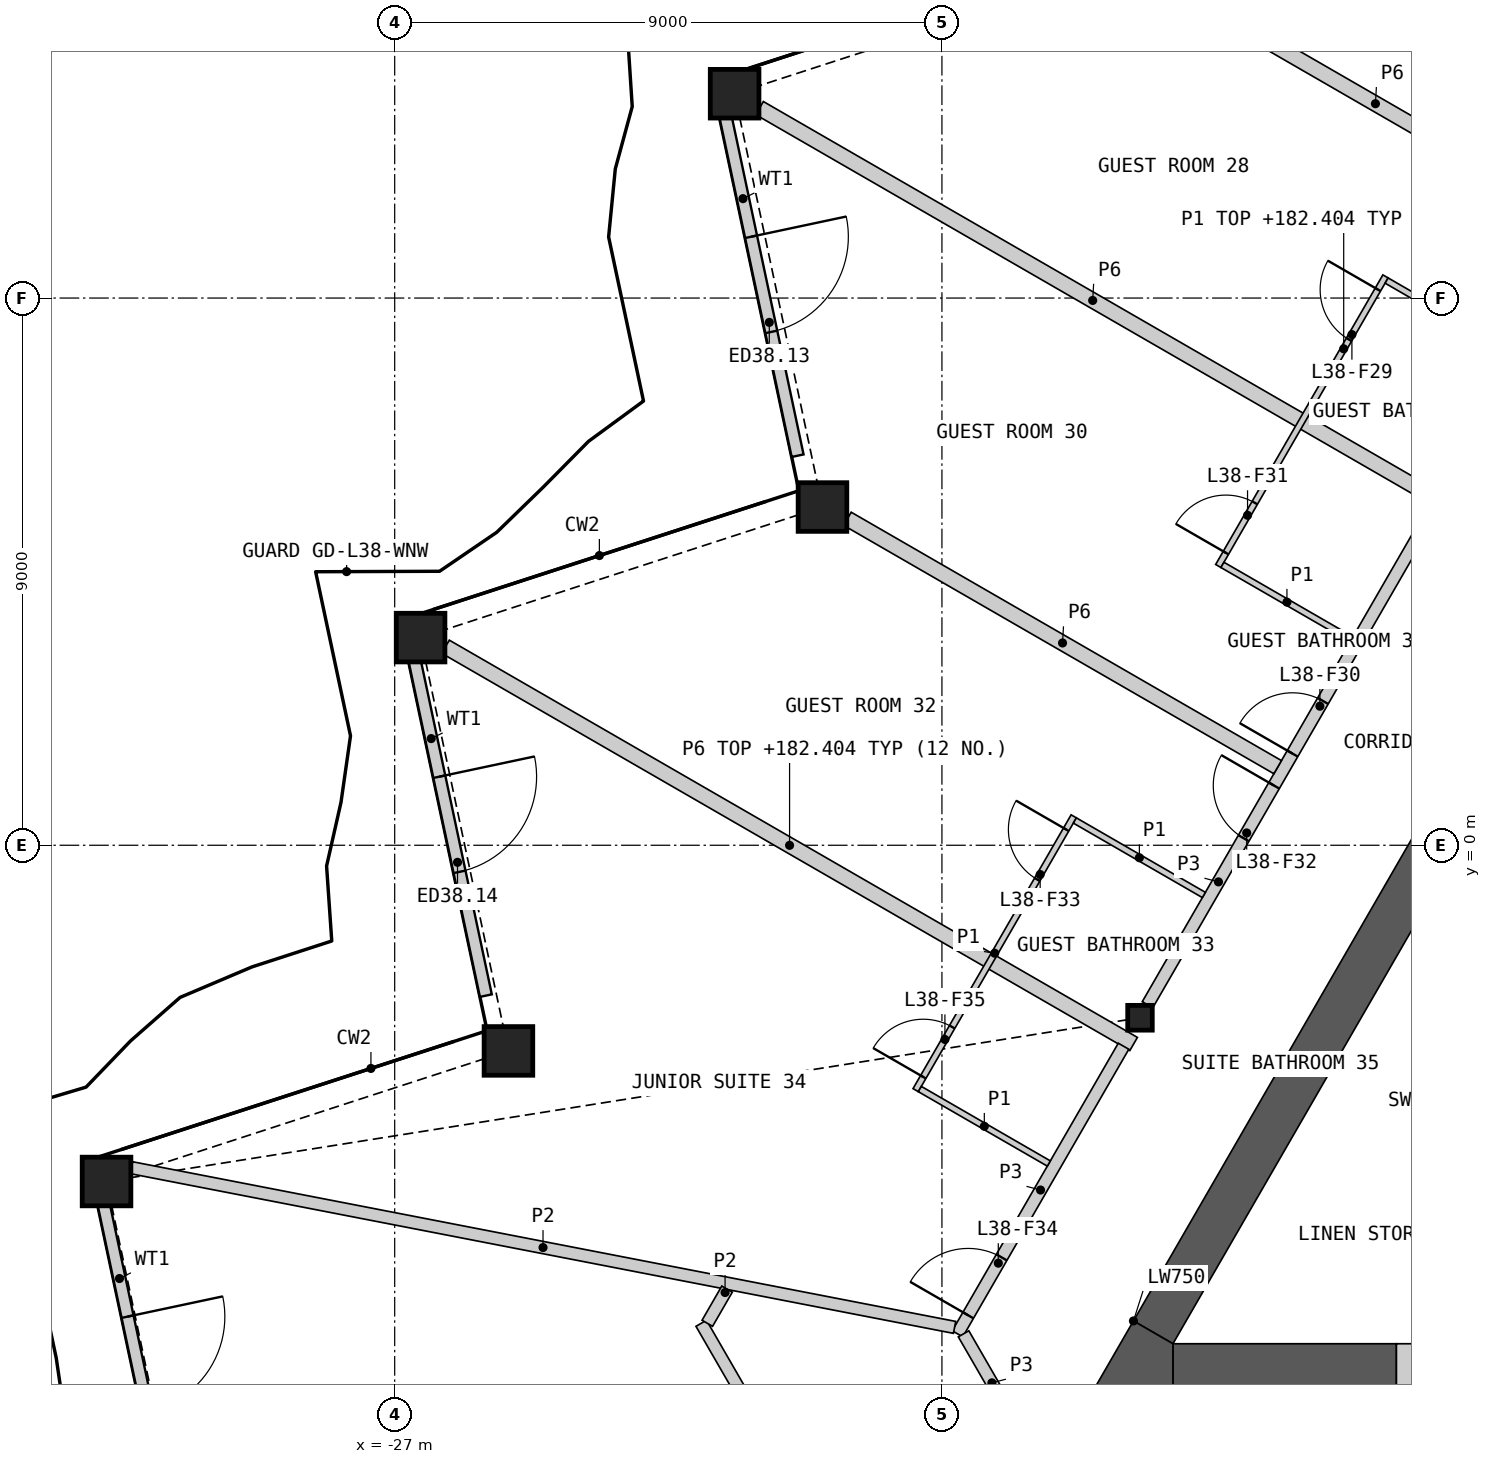
"""IFC4 building model, lengths in metres.
Left out: names, types, materials, properties, quantities, classifications, styles, units other than length and angle.
Written with IfcOpenShell. Run it as: python <this file> out.ifc"""

import sys

from ifc_helpers import new_model, si_unit, direction, frame, frame_2d, origin, origin_2d, place, context, subcontext, project, spatial, polyline, rectangle, hollow_rectangle, i_section, outline, extrude, element, fill, save


model = new_model("IFC4")
c1 = context("Model", 3, precision=1e-05, world=origin(), true_north=direction((0.0, 1.0)))
c2 = subcontext(c1, "Body", "Model", "MODEL_VIEW")
j1 = project(units=[si_unit("LENGTHUNIT", "METRE"), si_unit("PLANEANGLEUNIT", "RADIAN")], contexts=[c1])
p1 = place(None, origin())
s1 = spatial("IfcSite", under=j1, at=p1, CompositionType="ELEMENT")
p2 = place(p1, origin())
s2 = spatial("IfcBuilding", under=s1, at=p2, CompositionType="ELEMENT")
p3 = place(p2, frame((0.0, 0.0, 180.0)))
s3 = spatial("IfcBuildingStorey", under=s2, at=p3, CompositionType="ELEMENT", Elevation=180.0)
for number, where, z_axis, x_axis in (
    (1, (-21.409, 12.361, 0.0), (0.0, 0.0, 1.0), (1.0, 0.0, 0.0)),
    (2, (-19.965, 5.563, 0.0), (0.0, 0.0, 1.0), (1.0, 0.0, 0.0)),
    (3, (-26.574, 3.415, 0.0), (0.0, 0.0, 1.0), (1.0, 0.0, 0.0)),
    (4, (-25.129, -3.383, 0.0), (0.0, 0.0, 1.0), (1.0, 0.0, 0.0)),
    (5, (-31.739, -5.53, 0.0), (0.0, 0.0, 1.0), (1.0, 0.0, 0.0)),
):
    element("IfcColumn", number, at=place(p3, frame(where, z_axis=z_axis, x_axis=x_axis)), inside=s3, PredefinedType="COLUMN", context=c2, shape_type="SweptSolid", body=[
        extrude(hollow_rectangle(XDim=0.8, YDim=0.8, WallThickness=0.05, at=origin_2d()), origin(), (0.0, 0.0, 1.0), 3.6),
    ])
p4 = place(p3, frame((-14.743, -2.837, 0.0), z_axis=(0.0, 0.0, 1.0), x_axis=(1.0, 0.0, 0.0)))
e6 = element("IfcColumn", 6, at=p4, inside=s3, PredefinedType="COLUMN", context=c2, shape_type="SweptSolid", body=[
    extrude(i_section(OverallWidth=0.404, OverallDepth=0.407, WebThickness=0.027, FlangeThickness=0.044, at=origin_2d()), origin(), (0.0, 0.0, 1.0), 3.6),
])
p5 = place(p3, frame((-21.572, 12.044, 0.0), z_axis=(0.0, 0.0, 1.0), x_axis=(0.207914487103, -0.978147006361, 0.0)))
e7 = element("IfcWall", 7, at=p5, inside=s3, PredefinedType="SOLIDWALL", context=c2, shape_type="SweptSolid", body=[
    extrude(rectangle(XDim=5.763, YDim=0.2, at=frame_2d((2.882, 0.0))), origin(), (0.0, 0.0, 1.0), 2.701),
])
p6 = place(p5, frame((2.082, 0.0, 0.0)))
e8 = element("IfcOpeningElement", 8, at=p6, cuts=e7, PredefinedType="OPENING", context=c2, shape_type="SweptSolid", body=[
    extrude(rectangle(XDim=1.6, YDim=2.4, at=frame_2d((0.8, 1.2))), frame((0.0, 0.11, 0.0), z_axis=(0.0, -1.0, 0.0), x_axis=(1.0, 0.0, 0.0)), (0.0, 0.0, 1.0), 0.22),
])
p7 = place(p3, frame((-26.699, 3.164, 0.0), z_axis=(0.0, 0.0, 1.0), x_axis=(0.207914487103, -0.978147006361, 0.0)))
e9 = element("IfcWall", 9, at=p7, inside=s3, PredefinedType="SOLIDWALL", context=c2, shape_type="SweptSolid", body=[
    extrude(rectangle(XDim=5.763, YDim=0.2, at=frame_2d((2.882, 0.0))), origin(), (0.0, 0.0, 1.0), 2.701),
])
p8 = place(p7, frame((2.082, 0.0, 0.0)))
e10 = element("IfcOpeningElement", 10, at=p8, cuts=e9, PredefinedType="OPENING", context=c2, shape_type="SweptSolid", body=[
    extrude(rectangle(XDim=1.6, YDim=2.4, at=frame_2d((0.8, 1.2))), frame((0.0, 0.11, 0.0), z_axis=(0.0, -1.0, 0.0), x_axis=(1.0, 0.0, 0.0)), (0.0, 0.0, 1.0), 0.22),
])
p9 = place(p3, frame((-31.826, -5.717, 0.0), z_axis=(0.0, 0.0, 1.0), x_axis=(0.207914487103, -0.978147006361, 0.0)))
e11 = element("IfcWall", 11, at=p9, inside=s3, PredefinedType="SOLIDWALL", context=c2, shape_type="SweptSolid", body=[
    extrude(rectangle(XDim=5.763, YDim=0.2, at=frame_2d((2.882, 0.0))), origin(), (0.0, 0.0, 1.0), 2.701),
])
p10 = place(p9, frame((2.082, 0.0, 0.0)))
e12 = element("IfcOpeningElement", 12, at=p10, cuts=e11, PredefinedType="OPENING", context=c2, shape_type="SweptSolid", body=[
    extrude(rectangle(XDim=1.6, YDim=2.4, at=frame_2d((0.8, 1.2))), frame((0.0, 0.11, 0.0), z_axis=(0.0, -1.0, 0.0), x_axis=(1.0, 0.0, 0.0)), (0.0, 0.0, 1.0), 0.22),
])
p11 = place(p3, origin())
e13 = element("IfcWall", 13, at=p11, inside=s3, PredefinedType="SHEAR", context=c2, shape_type="SweptSolid", body=[
    extrude(outline(polyline([(-5.307, -1.281), (-10.374, -4.206), (-10.032, -4.298), (-5.182, -1.498), (-5.307, -1.281)])), origin(), (0.0, 0.0, 1.0), 3.25),
])
p12 = place(p3, origin())
e14 = element("IfcWall", 14, at=p12, inside=s3, PredefinedType="SHEAR", context=c2, shape_type="SweptSolid", body=[
    extrude(outline(polyline([(-10.374, -4.206), (-8.83, -6.881), (-8.738, -6.539), (-10.032, -4.298), (-10.374, -4.206)])), origin(), (0.0, 0.0, 1.0), 3.25),
])
p13 = place(p3, frame((-14.201, -8.574, 0.0), z_axis=(0.0, 0.0, 1.0), x_axis=(1.0, 0.0, 0.0)))
e15 = element("IfcWall", 15, at=p13, inside=s3, PredefinedType="SHEAR", context=c2, shape_type="SweptSolid", body=[
    extrude(rectangle(XDim=3.676, YDim=0.75, at=frame_2d((1.838, 0.0))), origin(), (0.0, 0.0, 1.0), 3.25),
])
p14 = place(p3, frame((-9.625, 0.477, 0.0), z_axis=(0.0, 0.0, 1.0), x_axis=(-0.499986234705, -0.866033351035, 0.0)))
e16 = element("IfcWall", 16, at=p14, inside=s3, PredefinedType="SHEAR", context=c2, shape_type="SweptSolid", body=[
    extrude(rectangle(XDim=9.801, YDim=0.75, at=frame_2d((4.9, 0.0))), origin(), (0.0, 0.0, 1.0), 3.25),
])
p15 = place(p3, origin())
e17 = element("IfcWall", 17, at=p15, inside=s3, PredefinedType="SHEAR", context=c2, shape_type="SweptSolid", body=[
    extrude(outline(polyline([(-14.851, -7.824), (-14.201, -8.199), (-14.201, -8.949), (-15.5, -8.949), (-14.851, -7.824)])), origin(), (0.0, 0.0, 1.0), 3.25),
])
p16 = place(p3, frame((-10.525, -8.574, 0.0), z_axis=(0.0, 0.0, 1.0), x_axis=(1.0, 0.0, 0.0)))
e18 = element("IfcWall", 18, at=p16, inside=s3, PredefinedType="SHEAR", context=c2, shape_type="SweptSolid", body=[
    extrude(rectangle(XDim=2.2, YDim=0.75, at=frame_2d((1.1, 0.0))), origin(), (0.0, 0.0, 1.0), 3.25),
])
p17 = place(p16, frame((0.6, 0.0, 0.0)))
e19 = element("IfcOpeningElement", 19, at=p17, cuts=e18, PredefinedType="OPENING", context=c2, shape_type="SweptSolid", body=[
    extrude(rectangle(XDim=1.0, YDim=2.1, at=frame_2d((0.5, 1.05))), frame((0.0, 0.385, 0.0), z_axis=(0.0, -1.0, 0.0), x_axis=(1.0, 0.0, 0.0)), (0.0, 0.0, 1.0), 0.77),
])
p18 = place(p3, frame((-26.164, 3.265, 0.0), z_axis=(0.0, 0.0, 1.0), x_axis=(0.866021313335, -0.500007084799, 0.0)))
e20 = element("IfcWall", 20, at=p18, inside=s3, PredefinedType="PARTITIONING", context=c2, shape_type="SweptSolid", body=[
    extrude(rectangle(XDim=13.068, YDim=0.25, at=frame_2d((6.534, 0.0))), origin(), (0.0, 0.0, 1.0), 2.404),
])
p19 = place(p3, frame((-21.0, 12.124, 0.0), z_axis=(0.0, 0.0, 1.0), x_axis=(0.866025883649, -0.499999168849, 0.0)))
e21 = element("IfcWall", 21, at=p19, inside=s3, PredefinedType="PARTITIONING", context=c2, shape_type="SweptSolid", body=[
    extrude(rectangle(XDim=12.652, YDim=0.25, at=frame_2d((6.326, 0.0))), origin(), (0.0, 0.0, 1.0), 2.404),
])
p20 = place(p3, frame((-14.619, -2.624, 0.0), z_axis=(0.0, 0.0, 1.0), x_axis=(0.50000393355, 0.866023132736, 0.0)))
e22 = element("IfcWall", 22, at=p20, inside=s3, PredefinedType="PARTITIONING", context=c2, shape_type="SweptSolid", body=[
    extrude(rectangle(XDim=9.335, YDim=0.2, at=frame_2d((4.667, 0.0))), origin(), (0.0, 0.0, 1.0), 3.25),
])
p21 = place(p20, frame((4.77, 0.0, 0.0)))
e23 = element("IfcOpeningElement", 23, at=p21, cuts=e22, PredefinedType="OPENING", context=c2, shape_type="SweptSolid", body=[
    extrude(rectangle(XDim=1.0, YDim=2.1, at=frame_2d((0.5, 1.05))), frame((0.0, 0.11, 0.0), z_axis=(0.0, -1.0, 0.0), x_axis=(1.0, 0.0, 0.0)), (0.0, 0.0, 1.0), 0.22),
])
p22 = place(p20, frame((3.163, 0.0, 0.0)))
e24 = element("IfcOpeningElement", 24, at=p22, cuts=e22, PredefinedType="OPENING", context=c2, shape_type="SweptSolid", body=[
    extrude(rectangle(XDim=1.0, YDim=2.1, at=frame_2d((0.5, 1.05))), frame((0.0, 0.11, 0.0), z_axis=(0.0, -1.0, 0.0), x_axis=(1.0, 0.0, 0.0)), (0.0, 0.0, 1.0), 0.22),
])
p23 = place(p3, frame((-19.555, 5.37, 0.0), z_axis=(0.0, 0.0, 1.0), x_axis=(0.866024371346, -0.500001788232, 0.0)))
e25 = element("IfcWall", 25, at=p23, inside=s3, PredefinedType="PARTITIONING", context=c2, shape_type="SweptSolid", body=[
    extrude(rectangle(XDim=8.171, YDim=0.25, at=frame_2d((4.085, 0.0))), origin(), (0.0, 0.0, 1.0), 2.404),
])
p24 = place(p3, frame((-14.39, 14.228, 0.0), z_axis=(0.0, 0.0, 1.0), x_axis=(0.866031008936, -0.499990291468, 0.0)))
e26 = element("IfcWall", 26, at=p24, inside=s3, PredefinedType="PARTITIONING", context=c2, shape_type="SweptSolid", body=[
    extrude(rectangle(XDim=8.127, YDim=0.25, at=frame_2d((4.063, 0.0))), origin(), (0.0, 0.0, 1.0), 2.404),
])
p25 = place(p3, frame((-17.744, -8.035, 0.0), z_axis=(0.0, 0.0, 1.0), x_axis=(0.49998041698, 0.866036709751, 0.0)))
e27 = element("IfcWall", 27, at=p25, inside=s3, PredefinedType="PARTITIONING", context=c2, shape_type="SweptSolid", body=[
    extrude(rectangle(XDim=5.462, YDim=0.2, at=frame_2d((2.731, 0.0))), origin(), (0.0, 0.0, 1.0), 3.25),
])
p26 = place(p25, frame((0.352, 0.0, 0.0)))
e28 = element("IfcOpeningElement", 28, at=p26, cuts=e27, PredefinedType="OPENING", context=c2, shape_type="SweptSolid", body=[
    extrude(rectangle(XDim=1.1, YDim=2.1, at=frame_2d((0.55, 1.05))), frame((0.0, 0.11, 0.0), z_axis=(0.0, -1.0, 0.0), x_axis=(1.0, 0.0, 0.0)), (0.0, 0.0, 1.0), 0.22),
])
p27 = place(p3, frame((-17.644, -8.035, 0.0), z_axis=(0.0, 0.0, 1.0), x_axis=(0.499958791762, -0.866049194065, 0.0)))
e29 = element("IfcWall", 29, at=p27, inside=s3, PredefinedType="PARTITIONING", context=c2, shape_type="SweptSolid", body=[
    extrude(rectangle(XDim=3.726, YDim=0.2, at=frame_2d((1.863, 0.0))), origin(), (0.0, 0.0, 1.0), 3.25),
])
p28 = place(p27, frame((1.388, 0.0, 0.0)))
e30 = element("IfcOpeningElement", 30, at=p28, cuts=e29, PredefinedType="OPENING", context=c2, shape_type="SweptSolid", body=[
    extrude(rectangle(XDim=0.95, YDim=2.1, at=frame_2d((0.475, 1.05))), frame((0.0, 0.11, 0.0), z_axis=(0.0, -1.0, 0.0), x_axis=(1.0, 0.0, 0.0)), (0.0, 0.0, 1.0), 0.22),
])
p29 = place(p3, frame((-31.329, -5.303, 0.0), z_axis=(0.0, 0.0, 1.0), x_axis=(0.981696755608, -0.190450728612, 0.0)))
e31 = element("IfcWall", 31, at=p29, inside=s3, PredefinedType="PARTITIONING", context=c2, shape_type="SweptSolid", body=[
    extrude(rectangle(XDim=13.79, YDim=0.2, at=frame_2d((6.895, 0.0))), origin(), (0.0, 0.0, 1.0), 2.404),
])
p30 = place(p3, frame((-21.958, -7.862, 0.0), z_axis=(0.0, 0.0, 1.0), x_axis=(0.499987304225, -0.866032733569, 0.0)))
e32 = element("IfcWall", 32, at=p30, inside=s3, PredefinedType="PARTITIONING", context=c2, shape_type="SweptSolid", body=[
    extrude(rectangle(XDim=4.176, YDim=0.2, at=frame_2d((2.088, 0.0))), origin(), (0.0, 0.0, 1.0), 2.404),
])
p31 = place(p3, frame((-21.859, -7.862, 0.0), z_axis=(0.0, 0.0, 1.0), x_axis=(0.500102178127, 0.865966403178, 0.0)))
e33 = element("IfcWall", 33, at=p31, inside=s3, PredefinedType="PARTITIONING", context=c2, shape_type="SweptSolid", body=[
    extrude(rectangle(XDim=0.649, YDim=0.2, at=frame_2d((0.325, 0.0))), origin(), (0.0, 0.0, 1.0), 2.404),
])
p32 = place(p3, frame((-13.455, 4.593, 0.0), z_axis=(0.0, 0.0, 1.0), x_axis=(0.500015767406, 0.866016300277, 0.0)))
e34 = element("IfcWall", 34, at=p32, inside=s3, PredefinedType="PARTITIONING", context=c2, shape_type="SweptSolid", body=[
    extrude(rectangle(XDim=5.5, YDim=0.1, at=frame_2d((2.75, 0.0))), origin(), (0.0, 0.0, 1.0), 2.404),
])
p33 = place(p32, frame((4.3, 0.0, 0.0)))
e35 = element("IfcOpeningElement", 35, at=p33, cuts=e34, PredefinedType="OPENING", context=c2, shape_type="SweptSolid", body=[
    extrude(rectangle(XDim=0.95, YDim=2.1, at=frame_2d((0.475, 1.05))), frame((0.0, 0.06, 0.0), z_axis=(0.0, -1.0, 0.0), x_axis=(1.0, 0.0, 0.0)), (0.0, 0.0, 1.0), 0.12),
])
p34 = place(p32, frame((0.25, 0.0, 0.0)))
e36 = element("IfcOpeningElement", 36, at=p34, cuts=e34, PredefinedType="OPENING", context=c2, shape_type="SweptSolid", body=[
    extrude(rectangle(XDim=0.95, YDim=2.1, at=frame_2d((0.475, 1.05))), frame((0.0, 0.06, 0.0), z_axis=(0.0, -1.0, 0.0), x_axis=(1.0, 0.0, 0.0)), (0.0, 0.0, 1.0), 0.12),
])
p35 = place(p3, frame((-18.432, -4.028, 0.0), z_axis=(0.0, 0.0, 1.0), x_axis=(0.499992051641, 0.866029992723, 0.0)))
e37 = element("IfcWall", 37, at=p35, inside=s3, PredefinedType="PARTITIONING", context=c2, shape_type="SweptSolid", body=[
    extrude(rectangle(XDim=5.2, YDim=0.1, at=frame_2d((2.6, 0.0))), origin(), (0.0, 0.0, 1.0), 2.404),
])
p36 = place(p35, frame((4.0, 0.0, 0.0)))
e38 = element("IfcOpeningElement", 38, at=p36, cuts=e37, PredefinedType="OPENING", context=c2, shape_type="SweptSolid", body=[
    extrude(rectangle(XDim=0.95, YDim=2.1, at=frame_2d((0.475, 1.05))), frame((0.0, 0.06, 0.0), z_axis=(0.0, -1.0, 0.0), x_axis=(1.0, 0.0, 0.0)), (0.0, 0.0, 1.0), 0.12),
])
p37 = place(p35, frame((0.25, 0.0, 0.0)))
e39 = element("IfcOpeningElement", 39, at=p37, cuts=e37, PredefinedType="OPENING", context=c2, shape_type="SweptSolid", body=[
    extrude(rectangle(XDim=0.95, YDim=2.1, at=frame_2d((0.475, 1.05))), frame((0.0, 0.06, 0.0), z_axis=(0.0, -1.0, 0.0), x_axis=(1.0, 0.0, 0.0)), (0.0, 0.0, 1.0), 0.12),
])
p38 = place(p3, frame((-13.387, 4.611, 0.0), z_axis=(0.0, 0.0, 1.0), x_axis=(0.866032905446, -0.499987006516, 0.0)))
e40 = element("IfcWall", 40, at=p38, inside=s3, PredefinedType="PARTITIONING", context=c2, shape_type="SweptSolid", body=[
    extrude(rectangle(XDim=2.45, YDim=0.1, at=frame_2d((1.225, 0.0))), origin(), (0.0, 0.0, 1.0), 2.404),
])
for number, where, z_axis, x_axis in (
    (41, (-15.814, 0.407, 0.0), (0.0, 0.0, 1.0), (0.866, -0.5, 0.0)),
    (42, (-18.364, -4.01, 0.0), (0.0, 0.0, 1.0), (0.866, -0.5, 0.0)),
):
    element("IfcWall", number, at=place(p3, frame(where, z_axis=z_axis, x_axis=x_axis)), inside=s3, PredefinedType="PARTITIONING", context=c2, shape_type="SweptSolid", body=[
        extrude(rectangle(XDim=2.45, YDim=0.1, at=frame_2d((1.225, 0.0))), origin(), (0.0, 0.0, 1.0), 2.404),
    ])
p39 = place(p3, frame((-10.687, 9.288, 0.0), z_axis=(0.0, 0.0, 1.0), x_axis=(0.866032905446, -0.499987006516, 0.0)))
e43 = element("IfcWall", 43, at=p39, inside=s3, PredefinedType="PARTITIONING", context=c2, shape_type="SweptSolid", body=[
    extrude(rectangle(XDim=2.45, YDim=0.1, at=frame_2d((1.225, 0.0))), origin(), (0.0, 0.0, 1.0), 2.404),
])
p40 = place(p6, origin())
e44 = element("IfcDoor", 44, at=p40, inside=s3, OperationType="DOUBLE_DOOR_SINGLE_SWING", PredefinedType="DOOR", context=c2, shape_type="SweptSolid", body=[
    extrude(rectangle(XDim=1.6, YDim=2.4, at=frame_2d((0.8, 1.2))), frame((0.0, 0.025, 0.0), z_axis=(0.0, -1.0, 0.0), x_axis=(1.0, 0.0, 0.0)), (0.0, 0.0, 1.0), 0.05),
])
fill(e8, e44)
p41 = place(p8, origin())
e45 = element("IfcDoor", 45, at=p41, inside=s3, OperationType="DOUBLE_DOOR_SINGLE_SWING", PredefinedType="DOOR", context=c2, shape_type="SweptSolid", body=[
    extrude(rectangle(XDim=1.6, YDim=2.4, at=frame_2d((0.8, 1.2))), frame((0.0, 0.025, 0.0), z_axis=(0.0, -1.0, 0.0), x_axis=(1.0, 0.0, 0.0)), (0.0, 0.0, 1.0), 0.05),
])
fill(e10, e45)
p42 = place(p10, origin())
e46 = element("IfcDoor", 46, at=p42, inside=s3, OperationType="DOUBLE_DOOR_SINGLE_SWING", PredefinedType="DOOR", context=c2, shape_type="SweptSolid", body=[
    extrude(rectangle(XDim=1.6, YDim=2.4, at=frame_2d((0.8, 1.2))), frame((0.0, 0.025, 0.0), z_axis=(0.0, -1.0, 0.0), x_axis=(1.0, 0.0, 0.0)), (0.0, 0.0, 1.0), 0.05),
])
fill(e12, e46)
p43 = place(p33, origin())
e47 = element("IfcDoor", 47, at=p43, inside=s3, OperationType="SINGLE_SWING_RIGHT", PredefinedType="DOOR", context=c2, shape_type="SweptSolid", body=[
    extrude(rectangle(XDim=0.95, YDim=2.1, at=frame_2d((0.475, 1.05))), frame((0.0, 0.025, 0.0), z_axis=(0.0, -1.0, 0.0), x_axis=(1.0, 0.0, 0.0)), (0.0, 0.0, 1.0), 0.05),
])
fill(e35, e47)
p44 = place(p21, origin())
e48 = element("IfcDoor", 48, at=p44, inside=s3, OperationType="SINGLE_SWING_LEFT", PredefinedType="DOOR", context=c2, shape_type="SweptSolid", body=[
    extrude(rectangle(XDim=1.0, YDim=2.1, at=frame_2d((0.5, 1.05))), frame((0.0, 0.025, 0.0), z_axis=(0.0, -1.0, 0.0), x_axis=(1.0, 0.0, 0.0)), (0.0, 0.0, 1.0), 0.05),
])
fill(e23, e48)
p45 = place(p34, origin())
e49 = element("IfcDoor", 49, at=p45, inside=s3, OperationType="SINGLE_SWING_LEFT", PredefinedType="DOOR", context=c2, shape_type="SweptSolid", body=[
    extrude(rectangle(XDim=0.95, YDim=2.1, at=frame_2d((0.475, 1.05))), frame((0.0, 0.025, 0.0), z_axis=(0.0, -1.0, 0.0), x_axis=(1.0, 0.0, 0.0)), (0.0, 0.0, 1.0), 0.05),
])
fill(e36, e49)
p46 = place(p22, origin())
e50 = element("IfcDoor", 50, at=p46, inside=s3, OperationType="SINGLE_SWING_RIGHT", PredefinedType="DOOR", context=c2, shape_type="SweptSolid", body=[
    extrude(rectangle(XDim=1.0, YDim=2.1, at=frame_2d((0.5, 1.05))), frame((0.0, 0.025, 0.0), z_axis=(0.0, -1.0, 0.0), x_axis=(1.0, 0.0, 0.0)), (0.0, 0.0, 1.0), 0.05),
])
fill(e24, e50)
p47 = place(p36, origin())
e51 = element("IfcDoor", 51, at=p47, inside=s3, OperationType="SINGLE_SWING_RIGHT", PredefinedType="DOOR", context=c2, shape_type="SweptSolid", body=[
    extrude(rectangle(XDim=0.95, YDim=2.1, at=frame_2d((0.475, 1.05))), frame((0.0, 0.025, 0.0), z_axis=(0.0, -1.0, 0.0), x_axis=(1.0, 0.0, 0.0)), (0.0, 0.0, 1.0), 0.05),
])
fill(e38, e51)
p48 = place(p26, origin())
e52 = element("IfcDoor", 52, at=p48, inside=s3, OperationType="SINGLE_SWING_LEFT", PredefinedType="DOOR", context=c2, shape_type="SweptSolid", body=[
    extrude(rectangle(XDim=1.1, YDim=2.1, at=frame_2d((0.55, 1.05))), frame((0.0, 0.025, 0.0), z_axis=(0.0, -1.0, 0.0), x_axis=(1.0, 0.0, 0.0)), (0.0, 0.0, 1.0), 0.05),
])
fill(e28, e52)
p49 = place(p37, origin())
e53 = element("IfcDoor", 53, at=p49, inside=s3, OperationType="SINGLE_SWING_LEFT", PredefinedType="DOOR", context=c2, shape_type="SweptSolid", body=[
    extrude(rectangle(XDim=0.95, YDim=2.1, at=frame_2d((0.475, 1.05))), frame((0.0, 0.025, 0.0), z_axis=(0.0, -1.0, 0.0), x_axis=(1.0, 0.0, 0.0)), (0.0, 0.0, 1.0), 0.05),
])
fill(e39, e53)
save(model, sys.argv[1])
